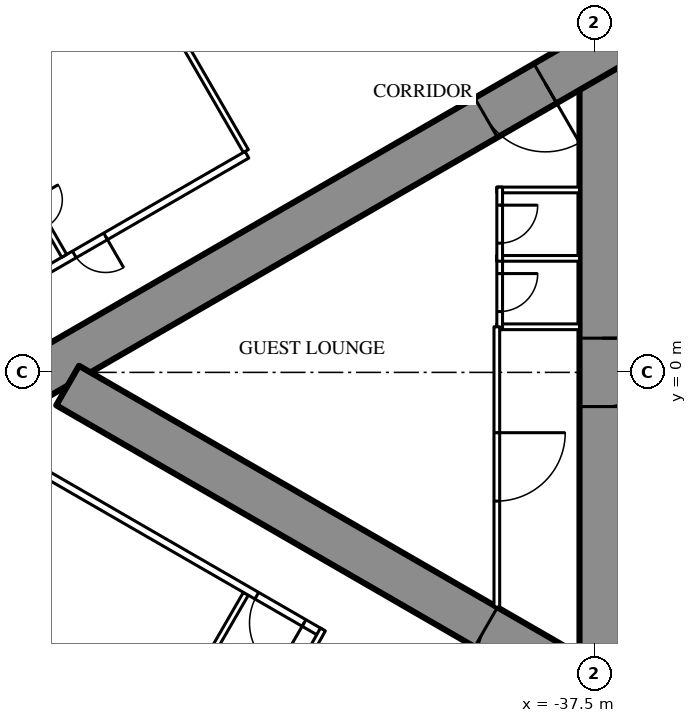
"""IFC4 building model, lengths in metres.
Left out: names, types, materials, properties, quantities, classifications, styles, units other than length and angle.
Written with IfcOpenShell. Run it as: python <this file> out.ifc"""

import sys

from ifc_helpers import new_model, si_unit, direction, frame, frame_2d, origin, place, context, subcontext, project, spatial, rectangle, extrude, element, fill, save


model = new_model("IFC4")
c1 = context("Model", 3, precision=1e-05, world=origin(), true_north=direction((0.0, 1.0)))
c2 = subcontext(c1, "Body", "Model", "MODEL_VIEW")
j1 = project(units=[si_unit("LENGTHUNIT", "METRE"), si_unit("PLANEANGLEUNIT", "RADIAN")], contexts=[c1])
p1 = place(None, origin())
s1 = spatial("IfcSite", under=j1, at=p1, CompositionType="ELEMENT")
p2 = place(p1, origin())
s2 = spatial("IfcBuilding", under=s1, at=p2, CompositionType="ELEMENT")
p3 = place(p2, frame((0.0, 0.0, 166.8)))
s3 = spatial("IfcBuildingStorey", under=s2, at=p3, CompositionType="ELEMENT", Elevation=166.8)
p4 = place(p3, frame((-37.3, 8.6, 0.0), z_axis=(0.0, 0.0, 1.0), x_axis=(0.0, -1.0, 0.0)))
e1 = element("IfcWall", 1, at=p4, inside=s3, PredefinedType="SHEAR", context=c2, shape_type="SweptSolid", body=[
    extrude(rectangle(XDim=17.2, YDim=1.2, at=frame_2d((8.6, 0.0))), origin(), (0.0, 0.0, 1.0), 3.5),
])
p5 = place(p4, frame((7.7, 0.0, 0.0)))
e2 = element("IfcOpeningElement", 2, at=p5, cuts=e1, PredefinedType="OPENING", context=c2, shape_type="SweptSolid", body=[
    extrude(rectangle(XDim=1.8, YDim=2.2, at=frame_2d((0.9, 1.1))), frame((0.0, 0.61, 0.0), z_axis=(0.0, -1.0, 0.0), x_axis=(1.0, 0.0, 0.0)), (0.0, 0.0, 1.0), 1.22),
])
p6 = place(p3, frame((-27.2, 14.3, 0.0), z_axis=(0.0, 0.0, 1.0), x_axis=(-0.866026593062, -0.499997940104, 0.0)))
e3 = element("IfcWall", 3, at=p6, inside=s3, PredefinedType="SHEAR", context=c2, shape_type="SweptSolid", body=[
    extrude(rectangle(XDim=28.946, YDim=1.2, at=frame_2d((14.473, 0.0))), origin(), (0.0, 0.0, 1.0), 3.5),
])
p7 = place(p6, frame((4.6, 0.0, 0.0)))
e4 = element("IfcOpeningElement", 4, at=p7, cuts=e3, PredefinedType="OPENING", context=c2, shape_type="SweptSolid", body=[
    extrude(rectangle(XDim=1.0, YDim=2.2, at=frame_2d((0.5, 1.1))), frame((0.0, 0.61, 0.0), z_axis=(0.0, -1.0, 0.0), x_axis=(1.0, 0.0, 0.0)), (0.0, 0.0, 1.0), 1.22),
])
p8 = place(p6, frame((13.395, 0.0, 0.0)))
e5 = element("IfcOpeningElement", 5, at=p8, cuts=e3, PredefinedType="OPENING", context=c2, shape_type="SweptSolid", body=[
    extrude(rectangle(XDim=1.8, YDim=2.2, at=frame_2d((0.9, 1.1))), frame((0.0, 0.61, 0.0), z_axis=(0.0, -1.0, 0.0), x_axis=(1.0, 0.0, 0.0)), (0.0, 0.0, 1.0), 1.22),
])
p9 = place(p3, frame((-27.2, -14.3, 0.0), z_axis=(0.0, 0.0, 1.0), x_axis=(-0.866024021859, 0.500002393557, 0.0)))
e6 = element("IfcWall", 6, at=p9, inside=s3, PredefinedType="SHEAR", context=c2, shape_type="SweptSolid", body=[
    extrude(rectangle(XDim=27.907, YDim=1.2, at=frame_2d((13.954, 0.0))), origin(), (0.0, 0.0, 1.0), 3.5),
])
p10 = place(p9, frame((4.6, 0.0, 0.0)))
e7 = element("IfcOpeningElement", 7, at=p10, cuts=e6, PredefinedType="OPENING", context=c2, shape_type="SweptSolid", body=[
    extrude(rectangle(XDim=1.0, YDim=2.2, at=frame_2d((0.5, 1.1))), frame((0.0, 0.61, 0.0), z_axis=(0.0, -1.0, 0.0), x_axis=(1.0, 0.0, 0.0)), (0.0, 0.0, 1.0), 1.22),
])
p11 = place(p9, frame((13.395, 0.0, 0.0)))
e8 = element("IfcOpeningElement", 8, at=p11, cuts=e6, PredefinedType="OPENING", context=c2, shape_type="SweptSolid", body=[
    extrude(rectangle(XDim=1.8, YDim=2.2, at=frame_2d((0.9, 1.1))), frame((0.0, 0.61, 0.0), z_axis=(0.0, -1.0, 0.0), x_axis=(1.0, 0.0, 0.0)), (0.0, 0.0, 1.0), 1.22),
])
for number, where, z_axis, x_axis in (
    (9, (-46.679, 5.825, 0.0), (0.0, 0.0, 1.0), (-0.5, 0.866, 0.0)),
    (10, (-46.679, -5.825, 0.0), (0.0, 0.0, 1.0), (-0.5, -0.866, 0.0)),
):
    element("IfcWall", number, at=place(p3, frame(where, z_axis=z_axis, x_axis=x_axis)), inside=s3, PredefinedType="PARTITIONING", context=c2, shape_type="SweptSolid", body=[
        extrude(rectangle(XDim=6.911, YDim=0.15, at=frame_2d((3.456, 0.0))), origin(), (0.0, 0.0, 1.0), 2.3),
    ])
p12 = place(p3, frame((-44.715, -6.844, 0.0), z_axis=(0.0, 0.0, 1.0), x_axis=(-0.866025261224, 0.500000246922, 0.0)))
e11 = element("IfcWall", 11, at=p12, inside=s3, PredefinedType="PARTITIONING", context=c2, shape_type="SweptSolid", body=[
    extrude(rectangle(XDim=13.567, YDim=0.2, at=frame_2d((6.783, 0.0))), origin(), (0.0, 0.0, 1.0), 3.25),
])
p13 = place(p12, frame((10.579, 0.0, 0.0)))
e12 = element("IfcOpeningElement", 12, at=p13, cuts=e11, PredefinedType="OPENING", context=c2, shape_type="SweptSolid", body=[
    extrude(rectangle(XDim=0.95, YDim=2.2, at=frame_2d((0.475, 1.1))), frame((0.0, 0.11, 0.0), z_axis=(0.0, -1.0, 0.0), x_axis=(1.0, 0.0, 0.0)), (0.0, 0.0, 1.0), 0.22),
])
p14 = place(p12, frame((8.879, 0.0, 0.0)))
e13 = element("IfcOpeningElement", 13, at=p14, cuts=e11, PredefinedType="OPENING", context=c2, shape_type="SweptSolid", body=[
    extrude(rectangle(XDim=0.95, YDim=2.2, at=frame_2d((0.475, 1.1))), frame((0.0, 0.11, 0.0), z_axis=(0.0, -1.0, 0.0), x_axis=(1.0, 0.0, 0.0)), (0.0, 0.0, 1.0), 0.22),
])
p15 = place(p12, frame((0.5, 0.0, 0.0)))
e14 = element("IfcOpeningElement", 14, at=p15, cuts=e11, PredefinedType="OPENING", context=c2, shape_type="SweptSolid", body=[
    extrude(rectangle(XDim=1.435, YDim=2.2, at=frame_2d((0.718, 1.1))), frame((0.0, 0.11, 0.0), z_axis=(0.0, -1.0, 0.0), x_axis=(1.0, 0.0, 0.0)), (0.0, 0.0, 1.0), 0.22),
])
p16 = place(p3, frame((-44.652, -6.764, 0.0), z_axis=(0.0, 0.0, 1.0), x_axis=(-0.485424724123, -0.874278466629, 0.0)))
e15 = element("IfcWall", 15, at=p16, inside=s3, PredefinedType="PARTITIONING", context=c2, shape_type="SweptSolid", body=[
    extrude(rectangle(XDim=1.805, YDim=0.15, at=frame_2d((0.903, 0.0))), origin(), (0.0, 0.0, 1.0), 3.25),
])
p17 = place(p3, frame((-46.65, 5.726, 0.0), z_axis=(0.0, 0.0, 1.0), x_axis=(-0.866027963864, -0.499995565786, 0.0)))
e16 = element("IfcWall", 16, at=p17, inside=s3, PredefinedType="PARTITIONING", context=c2, shape_type="SweptSolid", body=[
    extrude(rectangle(XDim=11.452, YDim=0.2, at=frame_2d((5.726, 0.0))), origin(), (0.0, 0.0, 1.0), 3.25),
])
p18 = place(p17, frame((4.294, 0.0, 0.0)))
e17 = element("IfcOpeningElement", 17, at=p18, cuts=e16, PredefinedType="OPENING", context=c2, shape_type="SweptSolid", body=[
    extrude(rectangle(XDim=0.95, YDim=2.2, at=frame_2d((0.475, 1.1))), frame((0.0, 0.11, 0.0), z_axis=(0.0, -1.0, 0.0), x_axis=(1.0, 0.0, 0.0)), (0.0, 0.0, 1.0), 0.22),
])
p19 = place(p17, frame((8.344, 0.0, 0.0)))
e18 = element("IfcOpeningElement", 18, at=p19, cuts=e16, PredefinedType="OPENING", context=c2, shape_type="SweptSolid", body=[
    extrude(rectangle(XDim=0.95, YDim=2.2, at=frame_2d((0.475, 1.1))), frame((0.0, 0.11, 0.0), z_axis=(0.0, -1.0, 0.0), x_axis=(1.0, 0.0, 0.0)), (0.0, 0.0, 1.0), 0.22),
])
p20 = place(p3, frame((-51.459, 3.065, 0.0), z_axis=(0.0, 0.0, 1.0), x_axis=(-0.499936506574, 0.866062058628, 0.0)))
e19 = element("IfcWall", 19, at=p20, inside=s3, PredefinedType="PARTITIONING", context=c2, shape_type="SweptSolid", body=[
    extrude(rectangle(XDim=2.6, YDim=0.15, at=frame_2d((1.3, 0.0))), origin(), (0.0, 0.0, 1.0), 3.25),
])
p21 = place(p20, frame((0.9, 0.0, 0.0)))
e20 = element("IfcOpeningElement", 20, at=p21, cuts=e19, PredefinedType="OPENING", context=c2, shape_type="SweptSolid", body=[
    extrude(rectangle(XDim=0.8, YDim=2.2, at=frame_2d((0.4, 1.1))), frame((0.0, 0.085, 0.0), z_axis=(0.0, -1.0, 0.0), x_axis=(1.0, 0.0, 0.0)), (0.0, 0.0, 1.0), 0.17),
])
for number, where, z_axis, x_axis in (
    (21, (-37.9, 1.2, 0.0), (0.0, 0.0, 1.0), (-1.0, 0.0, 0.0)),
    (22, (-37.9, 3.0, 0.0), (0.0, 0.0, 1.0), (-1.0, 0.0, 0.0)),
    (23, (-37.9, 4.8, 0.0), (0.0, 0.0, 1.0), (-1.0, 0.0, 0.0)),
):
    element("IfcWall", number, at=place(p3, frame(where, z_axis=z_axis, x_axis=x_axis)), inside=s3, PredefinedType="PARTITIONING", context=c2, shape_type="SweptSolid", body=[
        extrude(rectangle(XDim=2.175, YDim=0.15, at=frame_2d((1.087, 0.0))), origin(), (0.0, 0.0, 1.0), 3.25),
    ])
p22 = place(p3, frame((-40.0, 3.075, 0.0), z_axis=(0.0, 0.0, 1.0), x_axis=(0.0, -1.0, 0.0)))
e24 = element("IfcWall", 24, at=p22, inside=s3, PredefinedType="PARTITIONING", context=c2, shape_type="SweptSolid", body=[
    extrude(rectangle(XDim=1.95, YDim=0.15, at=frame_2d((0.975, 0.0))), origin(), (0.0, 0.0, 1.0), 3.25),
])
p23 = place(p22, frame((0.475, 0.0, 0.0)))
e25 = element("IfcOpeningElement", 25, at=p23, cuts=e24, PredefinedType="OPENING", context=c2, shape_type="SweptSolid", body=[
    extrude(rectangle(XDim=1.0, YDim=2.2, at=frame_2d((0.5, 1.1))), frame((0.0, 0.085, 0.0), z_axis=(0.0, -1.0, 0.0), x_axis=(1.0, 0.0, 0.0)), (0.0, 0.0, 1.0), 0.17),
])
p24 = place(p3, frame((-40.0, 4.875, 0.0), z_axis=(0.0, 0.0, 1.0), x_axis=(0.0, -1.0, 0.0)))
e26 = element("IfcWall", 26, at=p24, inside=s3, PredefinedType="PARTITIONING", context=c2, shape_type="SweptSolid", body=[
    extrude(rectangle(XDim=1.95, YDim=0.15, at=frame_2d((0.975, 0.0))), origin(), (0.0, 0.0, 1.0), 3.25),
])
p25 = place(p24, frame((0.475, 0.0, 0.0)))
e27 = element("IfcOpeningElement", 27, at=p25, cuts=e26, PredefinedType="OPENING", context=c2, shape_type="SweptSolid", body=[
    extrude(rectangle(XDim=1.0, YDim=2.2, at=frame_2d((0.5, 1.1))), frame((0.0, 0.085, 0.0), z_axis=(0.0, -1.0, 0.0), x_axis=(1.0, 0.0, 0.0)), (0.0, 0.0, 1.0), 0.17),
])
p26 = place(p3, frame((-40.075, 1.2, 0.0), z_axis=(0.0, 0.0, 1.0), x_axis=(0.0, -1.0, 0.0)))
e28 = element("IfcWall", 28, at=p26, inside=s3, PredefinedType="PARTITIONING", context=c2, shape_type="SweptSolid", body=[
    extrude(rectangle(XDim=7.374, YDim=0.15, at=frame_2d((3.687, 0.0))), origin(), (0.0, 0.0, 1.0), 3.25),
])
p27 = place(p26, frame((2.787, 0.0, 0.0)))
e29 = element("IfcOpeningElement", 29, at=p27, cuts=e28, PredefinedType="OPENING", context=c2, shape_type="SweptSolid", body=[
    extrude(rectangle(XDim=1.8, YDim=2.2, at=frame_2d((0.9, 1.1))), frame((0.0, 0.085, 0.0), z_axis=(0.0, -1.0, 0.0), x_axis=(1.0, 0.0, 0.0)), (0.0, 0.0, 1.0), 0.17),
])
p28 = place(p18, origin())
e30 = element("IfcDoor", 30, at=p28, inside=s3, OperationType="SINGLE_SWING_LEFT", PredefinedType="DOOR", context=c2, shape_type="SweptSolid", body=[
    extrude(rectangle(XDim=0.95, YDim=2.2, at=frame_2d((0.475, 1.1))), frame((0.0, 0.025, 0.0), z_axis=(0.0, -1.0, 0.0), x_axis=(1.0, 0.0, 0.0)), (0.0, 0.0, 1.0), 0.05),
])
fill(e17, e30)
p29 = place(p15, origin())
e31 = element("IfcDoor", 31, at=p29, inside=s3, OperationType="SINGLE_SWING_LEFT", PredefinedType="DOOR", context=c2, shape_type="SweptSolid", body=[
    extrude(rectangle(XDim=1.435, YDim=2.2, at=frame_2d((0.718, 1.1))), frame((0.0, 0.025, 0.0), z_axis=(0.0, -1.0, 0.0), x_axis=(1.0, 0.0, 0.0)), (0.0, 0.0, 1.0), 0.05),
])
fill(e14, e31)
p30 = place(p23, origin())
e32 = element("IfcDoor", 32, at=p30, inside=s3, OperationType="SINGLE_SWING_LEFT", PredefinedType="DOOR", context=c2, shape_type="SweptSolid", body=[
    extrude(rectangle(XDim=1.0, YDim=2.2, at=frame_2d((0.5, 1.1))), frame((0.0, 0.025, 0.0), z_axis=(0.0, -1.0, 0.0), x_axis=(1.0, 0.0, 0.0)), (0.0, 0.0, 1.0), 0.05),
])
fill(e25, e32)
p31 = place(p25, origin())
e33 = element("IfcDoor", 33, at=p31, inside=s3, OperationType="SINGLE_SWING_LEFT", PredefinedType="DOOR", context=c2, shape_type="SweptSolid", body=[
    extrude(rectangle(XDim=1.0, YDim=2.2, at=frame_2d((0.5, 1.1))), frame((0.0, 0.025, 0.0), z_axis=(0.0, -1.0, 0.0), x_axis=(1.0, 0.0, 0.0)), (0.0, 0.0, 1.0), 0.05),
])
fill(e27, e33)
p32 = place(p27, origin())
e34 = element("IfcDoor", 34, at=p32, inside=s3, OperationType="DOUBLE_DOOR_SINGLE_SWING", PredefinedType="DOOR", context=c2, shape_type="SweptSolid", body=[
    extrude(rectangle(XDim=1.8, YDim=2.2, at=frame_2d((0.9, 1.1))), frame((0.0, 0.025, 0.0), z_axis=(0.0, -1.0, 0.0), x_axis=(1.0, 0.0, 0.0)), (0.0, 0.0, 1.0), 0.05),
])
fill(e29, e34)
p33 = place(p8, origin())
e35 = element("IfcDoor", 35, at=p33, inside=s3, OperationType="DOUBLE_DOOR_SINGLE_SWING", PredefinedType="DOOR", context=c2, shape_type="SweptSolid", body=[
    extrude(rectangle(XDim=1.8, YDim=2.2, at=frame_2d((0.9, 1.1))), frame((0.0, 0.025, 0.0), z_axis=(0.0, -1.0, 0.0), x_axis=(1.0, 0.0, 0.0)), (0.0, 0.0, 1.0), 0.05),
])
fill(e5, e35)
p34 = place(p11, origin())
e36 = element("IfcDoor", 36, at=p34, inside=s3, OperationType="DOUBLE_DOOR_SINGLE_SWING", PredefinedType="DOOR", context=c2, shape_type="SweptSolid", body=[
    extrude(rectangle(XDim=1.8, YDim=2.2, at=frame_2d((0.9, 1.1))), frame((0.0, 0.025, 0.0), z_axis=(0.0, -1.0, 0.0), x_axis=(1.0, 0.0, 0.0)), (0.0, 0.0, 1.0), 0.05),
])
fill(e8, e36)
p35 = place(p5, origin())
e37 = element("IfcDoor", 37, at=p35, inside=s3, OperationType="DOUBLE_DOOR_SINGLE_SWING", PredefinedType="DOOR", context=c2, shape_type="SweptSolid", body=[
    extrude(rectangle(XDim=1.8, YDim=2.2, at=frame_2d((0.9, 1.1))), frame((0.0, 0.025, 0.0), z_axis=(0.0, -1.0, 0.0), x_axis=(1.0, 0.0, 0.0)), (0.0, 0.0, 1.0), 0.05),
])
fill(e2, e37)
save(model, sys.argv[1])
